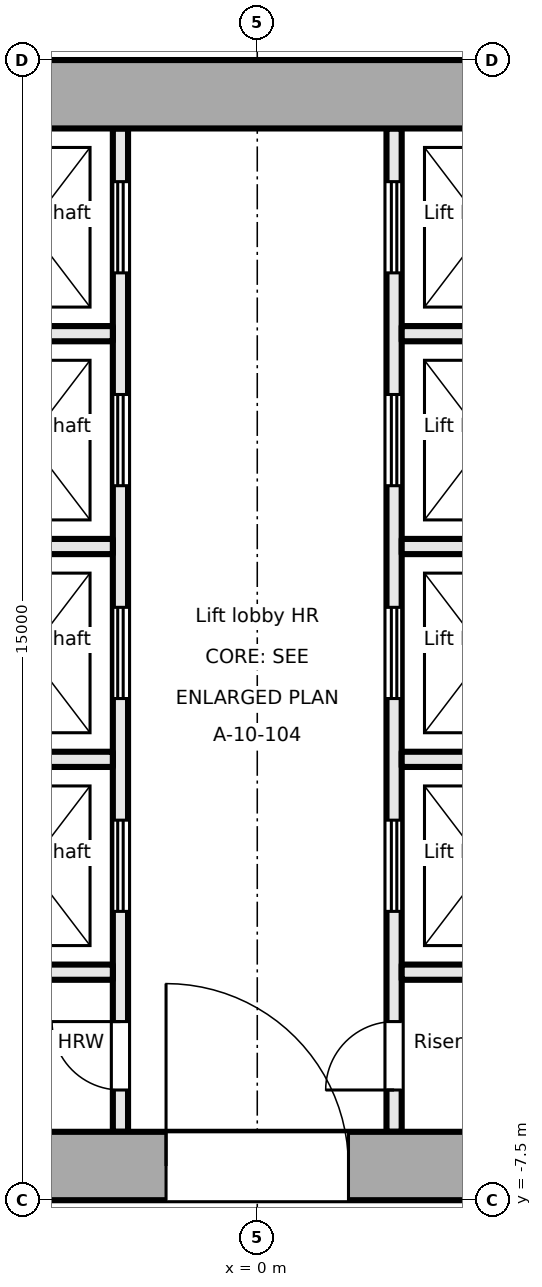
"""IFC4 building model, lengths in metres.
Left out: names, types, materials, properties, quantities, classifications, styles, units other than length and angle.
Written with IfcOpenShell. Run it as: python <this file> out.ifc"""

import sys

from ifc_helpers import new_model, si_unit, direction, frame, frame_2d, origin, place, context, subcontext, project, spatial, rectangle, extrude, element, fill, save


model = new_model("IFC4")
c1 = context("Model", 3, precision=1e-05, world=origin(), true_north=direction((0.0, 1.0)))
c2 = subcontext(c1, "Body", "Model", "MODEL_VIEW")
j1 = project(units=[si_unit("LENGTHUNIT", "METRE"), si_unit("PLANEANGLEUNIT", "RADIAN")], contexts=[c1])
p1 = place(None, origin())
s1 = spatial("IfcSite", under=j1, at=p1, CompositionType="ELEMENT")
p2 = place(p1, origin())
s2 = spatial("IfcBuilding", under=s1, at=p2, CompositionType="ELEMENT")
p3 = place(p2, frame((0.0, 0.0, 191.9)))
s3 = spatial("IfcBuildingStorey", under=s2, at=p3, CompositionType="ELEMENT", Elevation=191.9)
p4 = place(p3, frame((-18.0, -7.05, -0.2), z_axis=(0.0, 0.0, 1.0), x_axis=(1.0, 0.0, 0.0)))
e1 = element("IfcWall", 1, at=p4, inside=s3, PredefinedType="SHEAR", context=c2, shape_type="SweptSolid", body=[
    extrude(rectangle(XDim=36.0, YDim=0.9, at=frame_2d((18.0, 0.0))), origin(), (0.0, 0.0, 1.0), 3.9),
])
p5 = place(p4, frame((8.1, 0.0, 0.2)))
e2 = element("IfcOpeningElement", 2, at=p5, cuts=e1, PredefinedType="OPENING", context=c2, shape_type="SweptSolid", body=[
    extrude(rectangle(XDim=1.8, YDim=2.1, at=frame_2d((0.9, 1.05))), frame((0.0, 0.46, 0.0), z_axis=(0.0, -1.0, 0.0), x_axis=(1.0, 0.0, 0.0)), (0.0, 0.0, 1.0), 0.921),
])
p6 = place(p4, frame((16.8, 0.0, 0.2)))
e3 = element("IfcOpeningElement", 3, at=p6, cuts=e1, PredefinedType="OPENING", context=c2, shape_type="SweptSolid", body=[
    extrude(rectangle(XDim=2.4, YDim=2.1, at=frame_2d((1.2, 1.05))), frame((0.0, 0.46, 0.0), z_axis=(0.0, -1.0, 0.0), x_axis=(1.0, 0.0, 0.0)), (0.0, 0.0, 1.0), 0.921),
])
p7 = place(p4, frame((26.1, 0.0, 0.2)))
e4 = element("IfcOpeningElement", 4, at=p7, cuts=e1, PredefinedType="OPENING", context=c2, shape_type="SweptSolid", body=[
    extrude(rectangle(XDim=2.4, YDim=2.1, at=frame_2d((1.2, 1.05))), frame((0.0, 0.46, 0.0), z_axis=(0.0, -1.0, 0.0), x_axis=(1.0, 0.0, 0.0)), (0.0, 0.0, 1.0), 0.921),
])
p8 = place(p3, frame((-18.0, 7.05, -0.2), z_axis=(0.0, 0.0, 1.0), x_axis=(1.0, 0.0, 0.0)))
e5 = element("IfcWall", 5, at=p8, inside=s3, PredefinedType="SHEAR", context=c2, shape_type="SweptSolid", body=[
    extrude(rectangle(XDim=36.0, YDim=0.9, at=frame_2d((18.0, 0.0))), origin(), (0.0, 0.0, 1.0), 3.9),
])
p9 = place(p3, frame((-1.8, -6.6, 0.0), z_axis=(0.0, 0.0, 1.0), x_axis=(0.0, 1.0, 0.0)))
e6 = element("IfcWall", 6, at=p9, inside=s3, PredefinedType="PARTITIONING", context=c2, shape_type="SweptSolid", body=[
    extrude(rectangle(XDim=13.2, YDim=0.2, at=frame_2d((6.6, 0.0))), origin(), (0.0, 0.0, 1.0), 3.7),
])
p10 = place(p9, frame((0.55, 0.0, 0.0)))
e7 = element("IfcOpeningElement", 7, at=p10, cuts=e6, PredefinedType="OPENING", context=c2, shape_type="SweptSolid", body=[
    extrude(rectangle(XDim=0.9, YDim=2.1, at=frame_2d((0.45, 1.05))), frame((0.0, 0.111, 0.0), z_axis=(0.0, -1.0, 0.0), x_axis=(1.0, 0.0, 0.0)), (0.0, 0.0, 1.0), 0.221),
])
p11 = place(p9, frame((2.9, 0.0, 0.0)))
e8 = element("IfcOpeningElement", 8, at=p11, cuts=e6, PredefinedType="OPENING", context=c2, shape_type="SweptSolid", body=[
    extrude(rectangle(XDim=1.2, YDim=2.1, at=frame_2d((0.6, 1.05))), frame((0.0, 0.111, 0.0), z_axis=(0.0, -1.0, 0.0), x_axis=(1.0, 0.0, 0.0)), (0.0, 0.0, 1.0), 0.221),
])
p12 = place(p9, frame((5.7, 0.0, 0.0)))
e9 = element("IfcOpeningElement", 9, at=p12, cuts=e6, PredefinedType="OPENING", context=c2, shape_type="SweptSolid", body=[
    extrude(rectangle(XDim=1.2, YDim=2.1, at=frame_2d((0.6, 1.05))), frame((0.0, 0.111, 0.0), z_axis=(0.0, -1.0, 0.0), x_axis=(1.0, 0.0, 0.0)), (0.0, 0.0, 1.0), 0.221),
])
p13 = place(p9, frame((8.5, 0.0, 0.0)))
e10 = element("IfcOpeningElement", 10, at=p13, cuts=e6, PredefinedType="OPENING", context=c2, shape_type="SweptSolid", body=[
    extrude(rectangle(XDim=1.2, YDim=2.1, at=frame_2d((0.6, 1.05))), frame((0.0, 0.111, 0.0), z_axis=(0.0, -1.0, 0.0), x_axis=(1.0, 0.0, 0.0)), (0.0, 0.0, 1.0), 0.221),
])
p14 = place(p9, frame((11.3, 0.0, 0.0)))
e11 = element("IfcOpeningElement", 11, at=p14, cuts=e6, PredefinedType="OPENING", context=c2, shape_type="SweptSolid", body=[
    extrude(rectangle(XDim=1.2, YDim=2.1, at=frame_2d((0.6, 1.05))), frame((0.0, 0.111, 0.0), z_axis=(0.0, -1.0, 0.0), x_axis=(1.0, 0.0, 0.0)), (0.0, 0.0, 1.0), 0.221),
])
p15 = place(p3, frame((1.8, -6.6, 0.0), z_axis=(0.0, 0.0, 1.0), x_axis=(0.0, 1.0, 0.0)))
e12 = element("IfcWall", 12, at=p15, inside=s3, PredefinedType="PARTITIONING", context=c2, shape_type="SweptSolid", body=[
    extrude(rectangle(XDim=13.2, YDim=0.2, at=frame_2d((6.6, 0.0))), origin(), (0.0, 0.0, 1.0), 3.7),
])
p16 = place(p15, frame((0.55, 0.0, 0.0)))
e13 = element("IfcOpeningElement", 13, at=p16, cuts=e12, PredefinedType="OPENING", context=c2, shape_type="SweptSolid", body=[
    extrude(rectangle(XDim=0.9, YDim=2.1, at=frame_2d((0.45, 1.05))), frame((0.0, 0.111, 0.0), z_axis=(0.0, -1.0, 0.0), x_axis=(1.0, 0.0, 0.0)), (0.0, 0.0, 1.0), 0.221),
])
p17 = place(p15, frame((2.9, 0.0, 0.0)))
e14 = element("IfcOpeningElement", 14, at=p17, cuts=e12, PredefinedType="OPENING", context=c2, shape_type="SweptSolid", body=[
    extrude(rectangle(XDim=1.2, YDim=2.1, at=frame_2d((0.6, 1.05))), frame((0.0, 0.111, 0.0), z_axis=(0.0, -1.0, 0.0), x_axis=(1.0, 0.0, 0.0)), (0.0, 0.0, 1.0), 0.221),
])
p18 = place(p15, frame((5.7, 0.0, 0.0)))
e15 = element("IfcOpeningElement", 15, at=p18, cuts=e12, PredefinedType="OPENING", context=c2, shape_type="SweptSolid", body=[
    extrude(rectangle(XDim=1.2, YDim=2.1, at=frame_2d((0.6, 1.05))), frame((0.0, 0.111, 0.0), z_axis=(0.0, -1.0, 0.0), x_axis=(1.0, 0.0, 0.0)), (0.0, 0.0, 1.0), 0.221),
])
p19 = place(p15, frame((8.5, 0.0, 0.0)))
e16 = element("IfcOpeningElement", 16, at=p19, cuts=e12, PredefinedType="OPENING", context=c2, shape_type="SweptSolid", body=[
    extrude(rectangle(XDim=1.2, YDim=2.1, at=frame_2d((0.6, 1.05))), frame((0.0, 0.111, 0.0), z_axis=(0.0, -1.0, 0.0), x_axis=(1.0, 0.0, 0.0)), (0.0, 0.0, 1.0), 0.221),
])
p20 = place(p15, frame((11.3, 0.0, 0.0)))
e17 = element("IfcOpeningElement", 17, at=p20, cuts=e12, PredefinedType="OPENING", context=c2, shape_type="SweptSolid", body=[
    extrude(rectangle(XDim=1.2, YDim=2.1, at=frame_2d((0.6, 1.05))), frame((0.0, 0.111, 0.0), z_axis=(0.0, -1.0, 0.0), x_axis=(1.0, 0.0, 0.0)), (0.0, 0.0, 1.0), 0.221),
])
for number, where, z_axis, x_axis in (
    (18, (-4.2, -1.7, 0.0), (0.0, 0.0, 1.0), (1.0, 0.0, 0.0)),
    (19, (-4.2, 1.1, 0.0), (0.0, 0.0, 1.0), (1.0, 0.0, 0.0)),
    (20, (-4.2, 3.9, 0.0), (0.0, 0.0, 1.0), (1.0, 0.0, 0.0)),
    (21, (-4.2, -4.5, 0.0), (0.0, 0.0, 1.0), (1.0, 0.0, 0.0)),
    (22, (1.9, -1.7, 0.0), (0.0, 0.0, 1.0), (1.0, 0.0, 0.0)),
    (23, (1.9, 1.1, 0.0), (0.0, 0.0, 1.0), (1.0, 0.0, 0.0)),
    (24, (1.9, 3.9, 0.0), (0.0, 0.0, 1.0), (1.0, 0.0, 0.0)),
    (25, (1.9, -4.5, 0.0), (0.0, 0.0, 1.0), (1.0, 0.0, 0.0)),
):
    element("IfcWall", number, at=place(p3, frame(where, z_axis=z_axis, x_axis=x_axis)), inside=s3, PredefinedType="PARTITIONING", context=c2, shape_type="SweptSolid", body=[
        extrude(rectangle(XDim=2.3, YDim=0.2, at=frame_2d((1.15, 0.0))), origin(), (0.0, 0.0, 1.0), 3.7),
    ])
p21 = place(p10, origin())
e26 = element("IfcDoor", 26, at=p21, inside=s3, OperationType="SINGLE_SWING_RIGHT", PredefinedType="DOOR", context=c2, shape_type="SweptSolid", body=[
    extrude(rectangle(XDim=0.9, YDim=2.1, at=frame_2d((0.45, 1.05))), frame((0.0, 0.025, 0.0), z_axis=(0.0, -1.0, 0.0), x_axis=(1.0, 0.0, 0.0)), (0.0, 0.0, 1.0), 0.05),
])
fill(e7, e26)
p22 = place(p11, origin())
e27 = element("IfcDoor", 27, at=p22, inside=s3, OperationType="DOUBLE_DOOR_SLIDING", PredefinedType="DOOR", context=c2, shape_type="SweptSolid", body=[
    extrude(rectangle(XDim=1.2, YDim=2.1, at=frame_2d((0.6, 1.05))), frame((0.0, 0.025, 0.0), z_axis=(0.0, -1.0, 0.0), x_axis=(1.0, 0.0, 0.0)), (0.0, 0.0, 1.0), 0.05),
])
fill(e8, e27)
p23 = place(p12, origin())
e28 = element("IfcDoor", 28, at=p23, inside=s3, OperationType="DOUBLE_DOOR_SLIDING", PredefinedType="DOOR", context=c2, shape_type="SweptSolid", body=[
    extrude(rectangle(XDim=1.2, YDim=2.1, at=frame_2d((0.6, 1.05))), frame((0.0, 0.025, 0.0), z_axis=(0.0, -1.0, 0.0), x_axis=(1.0, 0.0, 0.0)), (0.0, 0.0, 1.0), 0.05),
])
fill(e9, e28)
p24 = place(p13, origin())
e29 = element("IfcDoor", 29, at=p24, inside=s3, OperationType="DOUBLE_DOOR_SLIDING", PredefinedType="DOOR", context=c2, shape_type="SweptSolid", body=[
    extrude(rectangle(XDim=1.2, YDim=2.1, at=frame_2d((0.6, 1.05))), frame((0.0, 0.025, 0.0), z_axis=(0.0, -1.0, 0.0), x_axis=(1.0, 0.0, 0.0)), (0.0, 0.0, 1.0), 0.05),
])
fill(e10, e29)
p25 = place(p14, origin())
e30 = element("IfcDoor", 30, at=p25, inside=s3, OperationType="DOUBLE_DOOR_SLIDING", PredefinedType="DOOR", context=c2, shape_type="SweptSolid", body=[
    extrude(rectangle(XDim=1.2, YDim=2.1, at=frame_2d((0.6, 1.05))), frame((0.0, 0.025, 0.0), z_axis=(0.0, -1.0, 0.0), x_axis=(1.0, 0.0, 0.0)), (0.0, 0.0, 1.0), 0.05),
])
fill(e11, e30)
p26 = place(p16, origin())
e31 = element("IfcDoor", 31, at=p26, inside=s3, OperationType="SINGLE_SWING_LEFT", PredefinedType="DOOR", context=c2, shape_type="SweptSolid", body=[
    extrude(rectangle(XDim=0.9, YDim=2.1, at=frame_2d((0.45, 1.05))), frame((0.0, 0.025, 0.0), z_axis=(0.0, -1.0, 0.0), x_axis=(1.0, 0.0, 0.0)), (0.0, 0.0, 1.0), 0.05),
])
fill(e13, e31)
p27 = place(p17, origin())
e32 = element("IfcDoor", 32, at=p27, inside=s3, OperationType="DOUBLE_DOOR_SLIDING", PredefinedType="DOOR", context=c2, shape_type="SweptSolid", body=[
    extrude(rectangle(XDim=1.2, YDim=2.1, at=frame_2d((0.6, 1.05))), frame((0.0, 0.025, 0.0), z_axis=(0.0, -1.0, 0.0), x_axis=(1.0, 0.0, 0.0)), (0.0, 0.0, 1.0), 0.05),
])
fill(e14, e32)
p28 = place(p18, origin())
e33 = element("IfcDoor", 33, at=p28, inside=s3, OperationType="DOUBLE_DOOR_SLIDING", PredefinedType="DOOR", context=c2, shape_type="SweptSolid", body=[
    extrude(rectangle(XDim=1.2, YDim=2.1, at=frame_2d((0.6, 1.05))), frame((0.0, 0.025, 0.0), z_axis=(0.0, -1.0, 0.0), x_axis=(1.0, 0.0, 0.0)), (0.0, 0.0, 1.0), 0.05),
])
fill(e15, e33)
p29 = place(p19, origin())
e34 = element("IfcDoor", 34, at=p29, inside=s3, OperationType="DOUBLE_DOOR_SLIDING", PredefinedType="DOOR", context=c2, shape_type="SweptSolid", body=[
    extrude(rectangle(XDim=1.2, YDim=2.1, at=frame_2d((0.6, 1.05))), frame((0.0, 0.025, 0.0), z_axis=(0.0, -1.0, 0.0), x_axis=(1.0, 0.0, 0.0)), (0.0, 0.0, 1.0), 0.05),
])
fill(e16, e34)
p30 = place(p20, origin())
e35 = element("IfcDoor", 35, at=p30, inside=s3, OperationType="DOUBLE_DOOR_SLIDING", PredefinedType="DOOR", context=c2, shape_type="SweptSolid", body=[
    extrude(rectangle(XDim=1.2, YDim=2.1, at=frame_2d((0.6, 1.05))), frame((0.0, 0.025, 0.0), z_axis=(0.0, -1.0, 0.0), x_axis=(1.0, 0.0, 0.0)), (0.0, 0.0, 1.0), 0.05),
])
fill(e17, e35)
p31 = place(p6, origin())
e36 = element("IfcDoor", 36, at=p31, inside=s3, OperationType="DOUBLE_DOOR_DOUBLE_SWING", PredefinedType="DOOR", context=c2, shape_type="SweptSolid", body=[
    extrude(rectangle(XDim=2.4, YDim=2.1, at=frame_2d((1.2, 1.05))), frame((0.0, 0.025, 0.0), z_axis=(0.0, -1.0, 0.0), x_axis=(1.0, 0.0, 0.0)), (0.0, 0.0, 1.0), 0.05),
])
fill(e3, e36)
save(model, sys.argv[1])
